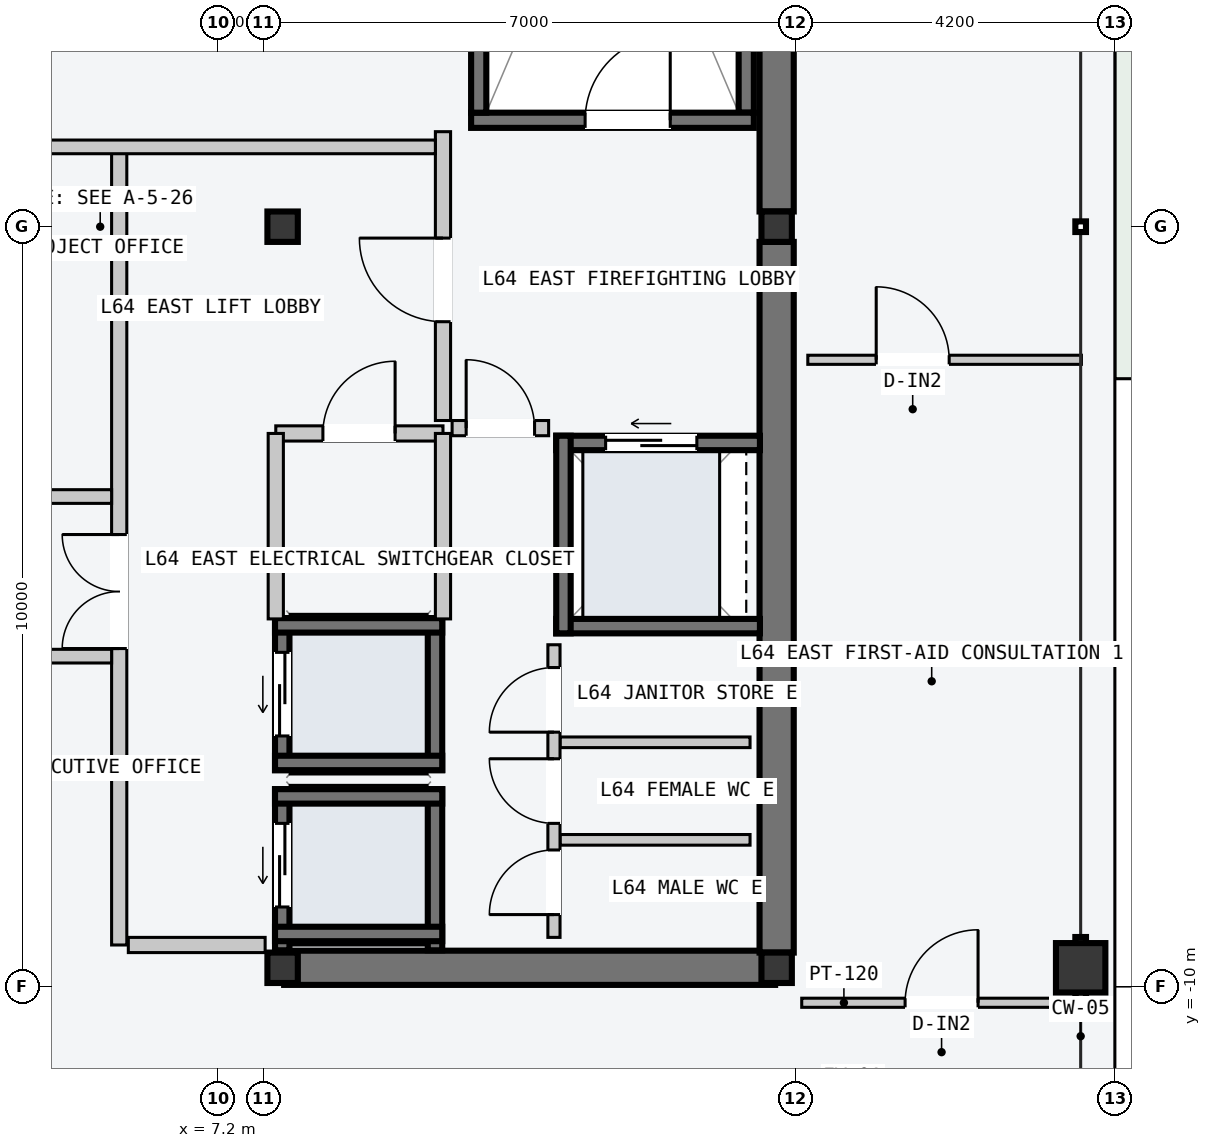
"""IFC4 building model, lengths in metres.
Left out: names, types, materials, properties, quantities, classifications, styles, units other than length and angle.
Written with IfcOpenShell. Run it as: python <this file> out.ifc"""

import sys

from ifc_helpers import new_model, si_unit, direction, frame, frame_2d, origin, origin_2d, place, context, subcontext, project, spatial, rectangle, hollow_rectangle, i_section, extrude, element, fill, save


model = new_model("IFC4")
c1 = context("Model", 3, precision=1e-05, world=origin(), true_north=direction((0.0, 1.0)))
c2 = subcontext(c1, "Body", "Model", "MODEL_VIEW")
j1 = project(units=[si_unit("LENGTHUNIT", "METRE"), si_unit("PLANEANGLEUNIT", "RADIAN")], contexts=[c1])
p1 = place(None, origin())
s1 = spatial("IfcSite", under=j1, at=p1, CompositionType="ELEMENT")
p2 = place(p1, origin())
s2 = spatial("IfcBuilding", under=s1, at=p2, CompositionType="ELEMENT")
p3 = place(p2, frame((0.0, 0.0, 243.6)))
s3 = spatial("IfcBuildingStorey", under=s2, at=p3, CompositionType="ELEMENT", Elevation=243.6)
p4 = place(p3, frame((8.07, -9.75, -0.2), z_axis=(0.0, 0.0, 1.0), x_axis=(1.0, 0.0, 0.0)))
e1 = element("IfcWall", 1, at=p4, inside=s3, PredefinedType="SHEAR", context=c2, shape_type="SweptSolid", body=[
    extrude(rectangle(XDim=6.46, YDim=0.45, at=frame_2d((3.23, 0.0))), origin(), (0.0, 0.0, 1.0), 3.6),
])
for number, where, z_axis, x_axis in (
    (2, (14.55, -9.55, -0.2), (0.0, 0.0, 1.0), (0.0, 1.0, 0.0)),
    (3, (14.55, 0.2, -0.2), (0.0, 0.0, 1.0), (0.0, 1.0, 0.0)),
):
    element("IfcWall", number, at=place(p3, frame(where, z_axis=z_axis, x_axis=x_axis)), inside=s3, PredefinedType="SHEAR", context=c2, shape_type="SweptSolid", body=[
        extrude(rectangle(XDim=9.35, YDim=0.45, at=frame_2d((4.675, 0.0))), origin(), (0.0, 0.0, 1.0), 3.6),
    ])
p5 = place(p3, frame((14.15, 1.5, -0.2), z_axis=(0.0, 0.0, 1.0), x_axis=(0.0, 1.0, 0.0)))
e4 = element("IfcWall", 4, at=p5, inside=s3, PredefinedType="SOLIDWALL", context=c2, shape_type="SweptSolid", body=[
    extrude(rectangle(XDim=7.8, YDim=0.2, at=frame_2d((3.9, 0.0))), origin(), (0.0, 0.0, 1.0), 3.6),
])
p6 = place(p3, frame((10.53, 1.4, -0.2), z_axis=(0.0, 0.0, 1.0), x_axis=(1.0, 0.0, 0.0)))
e5 = element("IfcWall", 5, at=p6, inside=s3, PredefinedType="SOLIDWALL", context=c2, shape_type="SweptSolid", body=[
    extrude(rectangle(XDim=3.72, YDim=0.2, at=frame_2d((1.86, 0.0))), origin(), (0.0, 0.0, 1.0), 3.6),
])
p7 = place(p6, frame((1.5, 0.0, 0.2)))
e6 = element("IfcOpeningElement", 6, at=p7, cuts=e5, PredefinedType="OPENING", context=c2, shape_type="SweptSolid", body=[
    extrude(rectangle(XDim=1.12, YDim=2.18, at=frame_2d((0.56, 1.09))), frame((0.0, 0.11, 0.0), z_axis=(0.0, -1.0, 0.0), x_axis=(1.0, 0.0, 0.0)), (0.0, 0.0, 1.0), 0.22),
])
p8 = place(p3, frame((10.63, 1.5, -0.2), z_axis=(0.0, 0.0, 1.0), x_axis=(0.0, 1.0, 0.0)))
e7 = element("IfcWall", 7, at=p8, inside=s3, PredefinedType="SOLIDWALL", context=c2, shape_type="SweptSolid", body=[
    extrude(rectangle(XDim=7.8, YDim=0.2, at=frame_2d((3.9, 0.0))), origin(), (0.0, 0.0, 1.0), 3.6),
])
for number, where, z_axis, x_axis in (
    (8, (8.05, -9.75, 0.0), (0.0, 0.0, 1.0), (1.0, 0.0, 0.0)),
    (9, (8.05, 0.0, 0.0), (0.0, 0.0, 1.0), (1.0, 0.0, 0.0)),
    (10, (14.55, -9.75, 0.0), (0.0, 0.0, 1.0), (1.0, 0.0, 0.0)),
    (11, (14.55, 0.0, 0.0), (0.0, 0.0, 1.0), (1.0, 0.0, 0.0)),
):
    element("IfcColumn", number, at=place(p3, frame(where, z_axis=z_axis, x_axis=x_axis)), inside=s3, PredefinedType="COLUMN", context=c2, shape_type="SweptSolid", body=[
        extrude(i_section(OverallWidth=0.4, OverallDepth=0.4, WebThickness=0.013, FlangeThickness=0.021, at=origin_2d()), origin(), (0.0, 0.0, 1.0), 3.6),
    ])
p9 = place(p3, frame((18.55, -9.75, 0.0), z_axis=(0.0, 0.0, 1.0), x_axis=(0.0, 1.0, 0.0)))
e12 = element("IfcColumn", 12, at=p9, inside=s3, PredefinedType="COLUMN", context=c2, shape_type="SweptSolid", body=[
    extrude(hollow_rectangle(XDim=0.65, YDim=0.65, WallThickness=0.028, at=origin_2d()), origin(), (0.0, 0.0, 1.0), 3.6),
])
p10 = place(p3, frame((8.045, -9.52, -0.2), z_axis=(0.0, 0.0, 1.0), x_axis=(0.0, 1.0, 0.0)))
e13 = element("IfcWall", 13, at=p10, inside=s3, PredefinedType="SOLIDWALL", context=c2, shape_type="SweptSolid", body=[
    extrude(rectangle(XDim=2.12, YDim=0.19, at=frame_2d((1.06, 0.0))), origin(), (0.0, 0.0, 1.0), 3.6),
])
p11 = place(p10, frame((0.57, 0.0, 0.2)))
e14 = element("IfcOpeningElement", 14, at=p11, cuts=e13, PredefinedType="OPENING", context=c2, shape_type="SweptSolid", body=[
    extrude(rectangle(XDim=1.1, YDim=2.2, at=frame_2d((0.55, 1.1))), frame((0.0, 0.105, 0.0), z_axis=(0.0, -1.0, 0.0), x_axis=(1.0, 0.0, 0.0)), (0.0, 0.0, 1.0), 0.21),
])
p12 = place(p3, frame((10.055, -9.52, -0.2), z_axis=(0.0, 0.0, 1.0), x_axis=(0.0, 1.0, 0.0)))
e15 = element("IfcWall", 15, at=p12, inside=s3, PredefinedType="SOLIDWALL", context=c2, shape_type="SweptSolid", body=[
    extrude(rectangle(XDim=2.12, YDim=0.19, at=frame_2d((1.06, 0.0))), origin(), (0.0, 0.0, 1.0), 3.6),
])
for number, where, z_axis, x_axis in (
    (16, (7.95, -7.495, -0.2), (0.0, 0.0, 1.0), (1.0, 0.0, 0.0)),
    (17, (7.95, -9.305, -0.2), (0.0, 0.0, 1.0), (1.0, 0.0, 0.0)),
):
    element("IfcWall", number, at=place(p3, frame(where, z_axis=z_axis, x_axis=x_axis)), inside=s3, PredefinedType="SOLIDWALL", context=c2, shape_type="SweptSolid", body=[
        extrude(rectangle(XDim=2.2, YDim=0.19, at=frame_2d((1.1, 0.0))), origin(), (0.0, 0.0, 1.0), 3.6),
    ])
p13 = place(p3, frame((8.045, -7.15, -0.2), z_axis=(0.0, 0.0, 1.0), x_axis=(0.0, 1.0, 0.0)))
e18 = element("IfcWall", 18, at=p13, inside=s3, PredefinedType="SOLIDWALL", context=c2, shape_type="SweptSolid", body=[
    extrude(rectangle(XDim=2.0, YDim=0.19, at=frame_2d((1.0, 0.0))), origin(), (0.0, 0.0, 1.0), 3.6),
])
p14 = place(p13, frame((0.45, 0.0, 0.2)))
e19 = element("IfcOpeningElement", 19, at=p14, cuts=e18, PredefinedType="OPENING", context=c2, shape_type="SweptSolid", body=[
    extrude(rectangle(XDim=1.1, YDim=2.2, at=frame_2d((0.55, 1.1))), frame((0.0, 0.105, 0.0), z_axis=(0.0, -1.0, 0.0), x_axis=(1.0, 0.0, 0.0)), (0.0, 0.0, 1.0), 0.21),
])
p15 = place(p3, frame((10.055, -7.15, -0.2), z_axis=(0.0, 0.0, 1.0), x_axis=(0.0, 1.0, 0.0)))
e20 = element("IfcWall", 20, at=p15, inside=s3, PredefinedType="SOLIDWALL", context=c2, shape_type="SweptSolid", body=[
    extrude(rectangle(XDim=2.0, YDim=0.19, at=frame_2d((1.0, 0.0))), origin(), (0.0, 0.0, 1.0), 3.6),
])
for number, where, z_axis, x_axis in (
    (21, (7.95, -5.245, -0.2), (0.0, 0.0, 1.0), (1.0, 0.0, 0.0)),
    (22, (7.95, -7.055, -0.2), (0.0, 0.0, 1.0), (1.0, 0.0, 0.0)),
):
    element("IfcWall", number, at=place(p3, frame(where, z_axis=z_axis, x_axis=x_axis)), inside=s3, PredefinedType="SOLIDWALL", context=c2, shape_type="SweptSolid", body=[
        extrude(rectangle(XDim=2.2, YDim=0.19, at=frame_2d((1.1, 0.0))), origin(), (0.0, 0.0, 1.0), 3.6),
    ])
p16 = place(p3, frame((11.65, -2.845, -0.2), z_axis=(0.0, 0.0, 1.0), x_axis=(1.0, 0.0, 0.0)))
e23 = element("IfcWall", 23, at=p16, inside=s3, PredefinedType="SOLIDWALL", context=c2, shape_type="SweptSolid", body=[
    extrude(rectangle(XDim=2.68, YDim=0.19, at=frame_2d((1.34, 0.0))), origin(), (0.0, 0.0, 1.0), 3.6),
])
p17 = place(p16, frame((0.65, 0.0, 0.2)))
e24 = element("IfcOpeningElement", 24, at=p17, cuts=e23, PredefinedType="OPENING", context=c2, shape_type="SweptSolid", body=[
    extrude(rectangle(XDim=1.2, YDim=2.2, at=frame_2d((0.6, 1.1))), frame((0.0, 0.105, 0.0), z_axis=(0.0, -1.0, 0.0), x_axis=(1.0, 0.0, 0.0)), (0.0, 0.0, 1.0), 0.21),
])
p18 = place(p3, frame((11.65, -5.255, -0.2), z_axis=(0.0, 0.0, 1.0), x_axis=(1.0, 0.0, 0.0)))
e25 = element("IfcWall", 25, at=p18, inside=s3, PredefinedType="SOLIDWALL", context=c2, shape_type="SweptSolid", body=[
    extrude(rectangle(XDim=2.68, YDim=0.19, at=frame_2d((1.34, 0.0))), origin(), (0.0, 0.0, 1.0), 3.6),
])
p19 = place(p3, frame((11.745, -5.35, -0.2), z_axis=(0.0, 0.0, 1.0), x_axis=(0.0, 1.0, 0.0)))
e26 = element("IfcWall", 26, at=p19, inside=s3, PredefinedType="SOLIDWALL", context=c2, shape_type="SweptSolid", body=[
    extrude(rectangle(XDim=2.6, YDim=0.19, at=frame_2d((1.3, 0.0))), origin(), (0.0, 0.0, 1.0), 3.6),
])
p20 = place(p3, frame((5.9, -9.45, 0.0), z_axis=(0.0, 0.0, 1.0), x_axis=(0.0, 1.0, 0.0)))
e27 = element("IfcWall", 27, at=p20, inside=s3, PredefinedType="PARTITIONING", context=c2, shape_type="SweptSolid", body=[
    extrude(rectangle(XDim=10.5, YDim=0.2, at=frame_2d((5.25, 0.0))), origin(), (0.0, 0.0, 1.0), 3.4),
])
p21 = place(p20, frame((3.9, 0.0, 0.0)))
e28 = element("IfcOpeningElement", 28, at=p21, cuts=e27, PredefinedType="OPENING", context=c2, shape_type="SweptSolid", body=[
    extrude(rectangle(XDim=1.5, YDim=2.2, at=frame_2d((0.75, 1.1))), frame((0.0, 0.11, 0.0), z_axis=(0.0, -1.0, 0.0), x_axis=(1.0, 0.0, 0.0)), (0.0, 0.0, 1.0), 0.22),
])
p22 = place(p3, frame((6.02, -9.45, 0.0), z_axis=(0.0, 0.0, 1.0), x_axis=(1.0, 0.0, 0.0)))
e29 = element("IfcWall", 29, at=p22, inside=s3, PredefinedType="PARTITIONING", context=c2, shape_type="SweptSolid", body=[
    extrude(rectangle(XDim=1.8, YDim=0.2, at=frame_2d((0.9, 0.0))), origin(), (0.0, 0.0, 1.0), 3.4),
])
p23 = place(p3, frame((10.16, -2.55, 0.0), z_axis=(0.0, 0.0, 1.0), x_axis=(0.0, 1.0, 0.0)))
e30 = element("IfcWall", 30, at=p23, inside=s3, PredefinedType="PARTITIONING", context=c2, shape_type="SweptSolid", body=[
    extrude(rectangle(XDim=3.8, YDim=0.2, at=frame_2d((1.9, 0.0))), origin(), (0.0, 0.0, 1.0), 3.4),
])
p24 = place(p23, frame((1.3, 0.0, 0.0)))
e31 = element("IfcOpeningElement", 31, at=p24, cuts=e30, PredefinedType="OPENING", context=c2, shape_type="SweptSolid", body=[
    extrude(rectangle(XDim=1.1, YDim=2.15, at=frame_2d((0.55, 1.075))), frame((0.0, 0.11, 0.0), z_axis=(0.0, -1.0, 0.0), x_axis=(1.0, 0.0, 0.0)), (0.0, 0.0, 1.0), 0.22),
])
p25 = place(p3, frame((10.28, -2.65, 0.0), z_axis=(0.0, 0.0, 1.0), x_axis=(1.0, 0.0, 0.0)))
e32 = element("IfcWall", 32, at=p25, inside=s3, PredefinedType="PARTITIONING", context=c2, shape_type="SweptSolid", body=[
    extrude(rectangle(XDim=1.27, YDim=0.2, at=frame_2d((0.635, 0.0))), origin(), (0.0, 0.0, 1.0), 3.4),
])
p26 = place(p25, frame((0.185, 0.0, 0.0)))
e33 = element("IfcOpeningElement", 33, at=p26, cuts=e32, PredefinedType="OPENING", context=c2, shape_type="SweptSolid", body=[
    extrude(rectangle(XDim=0.9, YDim=2.15, at=frame_2d((0.45, 1.075))), frame((0.0, 0.11, 0.0), z_axis=(0.0, -1.0, 0.0), x_axis=(1.0, 0.0, 0.0)), (0.0, 0.0, 1.0), 0.22),
])
p27 = place(p3, frame((7.96, -2.72, 0.0), z_axis=(0.0, 0.0, 1.0), x_axis=(1.0, 0.0, 0.0)))
e34 = element("IfcWall", 34, at=p27, inside=s3, PredefinedType="PARTITIONING", context=c2, shape_type="SweptSolid", body=[
    extrude(rectangle(XDim=2.2, YDim=0.2, at=frame_2d((1.1, 0.0))), origin(), (0.0, 0.0, 1.0), 3.4),
])
p28 = place(p27, frame((0.62, 0.0, 0.0)))
e35 = element("IfcOpeningElement", 35, at=p28, cuts=e34, PredefinedType="OPENING", context=c2, shape_type="SweptSolid", body=[
    extrude(rectangle(XDim=0.95, YDim=2.1, at=frame_2d((0.475, 1.05))), frame((0.0, 0.11, 0.0), z_axis=(0.0, -1.0, 0.0), x_axis=(1.0, 0.0, 0.0)), (0.0, 0.0, 1.0), 0.22),
])
for number, where, z_axis, x_axis in (
    (36, (7.96, -5.16, 0.0), (0.0, 0.0, 1.0), (0.0, 1.0, 0.0)),
    (37, (10.16, -5.16, 0.0), (0.0, 0.0, 1.0), (0.0, 1.0, 0.0)),
):
    element("IfcWall", number, at=place(p3, frame(where, z_axis=z_axis, x_axis=x_axis)), inside=s3, PredefinedType="PARTITIONING", context=c2, shape_type="SweptSolid", body=[
        extrude(rectangle(XDim=2.44, YDim=0.2, at=frame_2d((1.22, 0.0))), origin(), (0.0, 0.0, 1.0), 3.4),
    ])
for number, where, z_axis, x_axis in (
    (38, (11.7, -8.067, 0.0), (0.0, 0.0, 1.0), (1.0, 0.0, 0.0)),
    (39, (11.7, -6.783, 0.0), (0.0, 0.0, 1.0), (1.0, 0.0, 0.0)),
):
    element("IfcWall", number, at=place(p3, frame(where, z_axis=z_axis, x_axis=x_axis)), inside=s3, PredefinedType="PARTITIONING", context=c2, shape_type="SweptSolid", body=[
        extrude(rectangle(XDim=2.5, YDim=0.14, at=frame_2d((1.25, 0.0))), origin(), (0.0, 0.0, 1.0), 3.4),
    ])
p29 = place(p3, frame((11.62, -9.35, 0.0), z_axis=(0.0, 0.0, 1.0), x_axis=(0.0, 1.0, 0.0)))
e40 = element("IfcWall", 40, at=p29, inside=s3, PredefinedType="PARTITIONING", context=c2, shape_type="SweptSolid", body=[
    extrude(rectangle(XDim=3.85, YDim=0.16, at=frame_2d((1.925, 0.0))), origin(), (0.0, 0.0, 1.0), 3.4),
])
p30 = place(p29, frame((0.3, 0.0, 0.0)))
e41 = element("IfcOpeningElement", 41, at=p30, cuts=e40, PredefinedType="OPENING", context=c2, shape_type="SweptSolid", body=[
    extrude(rectangle(XDim=0.85, YDim=2.12, at=frame_2d((0.425, 1.06))), frame((0.0, 0.09, 0.0), z_axis=(0.0, -1.0, 0.0), x_axis=(1.0, 0.0, 0.0)), (0.0, 0.0, 1.0), 0.18),
])
p31 = place(p29, frame((1.5, 0.0, 0.0)))
e42 = element("IfcOpeningElement", 42, at=p31, cuts=e40, PredefinedType="OPENING", context=c2, shape_type="SweptSolid", body=[
    extrude(rectangle(XDim=0.85, YDim=2.12, at=frame_2d((0.425, 1.06))), frame((0.0, 0.09, 0.0), z_axis=(0.0, -1.0, 0.0), x_axis=(1.0, 0.0, 0.0)), (0.0, 0.0, 1.0), 0.18),
])
p32 = place(p29, frame((2.7, 0.0, 0.0)))
e43 = element("IfcOpeningElement", 43, at=p32, cuts=e40, PredefinedType="OPENING", context=c2, shape_type="SweptSolid", body=[
    extrude(rectangle(XDim=0.85, YDim=2.12, at=frame_2d((0.425, 1.06))), frame((0.0, 0.09, 0.0), z_axis=(0.0, -1.0, 0.0), x_axis=(1.0, 0.0, 0.0)), (0.0, 0.0, 1.0), 0.18),
])
p33 = place(p3, frame((3.01, 1.05, 0.0), z_axis=(0.0, 0.0, 1.0), x_axis=(1.0, 0.0, 0.0)))
e44 = element("IfcWall", 44, at=p33, inside=s3, PredefinedType="PARTITIONING", context=c2, shape_type="SweptSolid", body=[
    extrude(rectangle(XDim=7.05, YDim=0.18, at=frame_2d((3.525, 0.0))), origin(), (0.0, 0.0, 1.0), 3.4),
])
for number, where, z_axis, x_axis in (
    (45, (3.01, -3.55, 0.0), (0.0, 0.0, 1.0), (1.0, 0.0, 0.0)),
    (46, (3.01, -5.65, 0.0), (0.0, 0.0, 1.0), (1.0, 0.0, 0.0)),
):
    element("IfcWall", number, at=place(p3, frame(where, z_axis=z_axis, x_axis=x_axis)), inside=s3, PredefinedType="PARTITIONING", context=c2, shape_type="SweptSolid", body=[
        extrude(rectangle(XDim=2.79, YDim=0.18, at=frame_2d((1.395, 0.0))), origin(), (0.0, 0.0, 1.0), 3.4),
    ])
p34 = place(p3, frame((14.88, -10.21, 0.0), z_axis=(0.0, 0.0, 1.0), x_axis=(1.0, 0.0, 0.0)))
e47 = element("IfcWall", 47, at=p34, inside=s3, PredefinedType="PARTITIONING", context=c2, shape_type="SweptSolid", body=[
    extrude(rectangle(XDim=3.68, YDim=0.12, at=frame_2d((1.84, 0.0))), origin(), (0.0, 0.0, 1.0), 3.4),
])
p35 = place(p34, frame((1.36, 0.0, 0.0)))
e48 = element("IfcOpeningElement", 48, at=p35, cuts=e47, PredefinedType="OPENING", context=c2, shape_type="SweptSolid", body=[
    extrude(rectangle(XDim=0.96, YDim=2.18, at=frame_2d((0.48, 1.09))), frame((0.0, 0.07, 0.0), z_axis=(0.0, -1.0, 0.0), x_axis=(1.0, 0.0, 0.0)), (0.0, 0.0, 1.0), 0.14),
])
p36 = place(p3, frame((14.96, -1.751, 0.0), z_axis=(0.0, 0.0, 1.0), x_axis=(1.0, 0.0, 0.0)))
e49 = element("IfcWall", 49, at=p36, inside=s3, PredefinedType="PARTITIONING", context=c2, shape_type="SweptSolid", body=[
    extrude(rectangle(XDim=3.6, YDim=0.12, at=frame_2d((1.8, 0.0))), origin(), (0.0, 0.0, 1.0), 3.4),
])
p37 = place(p36, frame((0.9, 0.0, 0.0)))
e50 = element("IfcOpeningElement", 50, at=p37, cuts=e49, PredefinedType="OPENING", context=c2, shape_type="SweptSolid", body=[
    extrude(rectangle(XDim=0.96, YDim=2.18, at=frame_2d((0.48, 1.09))), frame((0.0, 0.07, 0.0), z_axis=(0.0, -1.0, 0.0), x_axis=(1.0, 0.0, 0.0)), (0.0, 0.0, 1.0), 0.14),
])
p38 = place(p7, origin())
e51 = element("IfcDoor", 51, at=p38, inside=s3, OperationType="SINGLE_SWING_RIGHT", PredefinedType="DOOR", context=c2, shape_type="SweptSolid", body=[
    extrude(rectangle(XDim=1.12, YDim=2.18, at=frame_2d((0.56, 1.09))), frame((0.0, 0.025, 0.0), z_axis=(0.0, -1.0, 0.0), x_axis=(1.0, 0.0, 0.0)), (0.0, 0.0, 1.0), 0.05),
])
fill(e6, e51)
p39 = place(p11, origin())
e52 = element("IfcDoor", 52, at=p39, inside=s3, OperationType="SLIDING_TO_LEFT", PredefinedType="DOOR", context=c2, shape_type="SweptSolid", body=[
    extrude(rectangle(XDim=1.1, YDim=2.2, at=frame_2d((0.55, 1.1))), frame((0.0, 0.025, 0.0), z_axis=(0.0, -1.0, 0.0), x_axis=(1.0, 0.0, 0.0)), (0.0, 0.0, 1.0), 0.05),
])
fill(e14, e52)
p40 = place(p14, origin())
e53 = element("IfcDoor", 53, at=p40, inside=s3, OperationType="SLIDING_TO_LEFT", PredefinedType="DOOR", context=c2, shape_type="SweptSolid", body=[
    extrude(rectangle(XDim=1.1, YDim=2.2, at=frame_2d((0.55, 1.1))), frame((0.0, 0.025, 0.0), z_axis=(0.0, -1.0, 0.0), x_axis=(1.0, 0.0, 0.0)), (0.0, 0.0, 1.0), 0.05),
])
fill(e19, e53)
p41 = place(p17, origin())
e54 = element("IfcDoor", 54, at=p41, inside=s3, OperationType="SLIDING_TO_LEFT", PredefinedType="DOOR", context=c2, shape_type="SweptSolid", body=[
    extrude(rectangle(XDim=1.2, YDim=2.2, at=frame_2d((0.6, 1.1))), frame((0.0, 0.025, 0.0), z_axis=(0.0, -1.0, 0.0), x_axis=(1.0, 0.0, 0.0)), (0.0, 0.0, 1.0), 0.05),
])
fill(e24, e54)
p42 = place(p21, origin())
e55 = element("IfcDoor", 55, at=p42, inside=s3, OperationType="DOUBLE_DOOR_SINGLE_SWING", PredefinedType="DOOR", context=c2, shape_type="SweptSolid", body=[
    extrude(rectangle(XDim=1.5, YDim=2.2, at=frame_2d((0.75, 1.1))), frame((0.0, 0.025, 0.0), z_axis=(0.0, -1.0, 0.0), x_axis=(1.0, 0.0, 0.0)), (0.0, 0.0, 1.0), 0.05),
])
fill(e28, e55)
p43 = place(p24, origin())
e56 = element("IfcDoor", 56, at=p43, inside=s3, OperationType="SINGLE_SWING_RIGHT", PredefinedType="DOOR", context=c2, shape_type="SweptSolid", body=[
    extrude(rectangle(XDim=1.1, YDim=2.15, at=frame_2d((0.55, 1.075))), frame((0.0, 0.025, 0.0), z_axis=(0.0, -1.0, 0.0), x_axis=(1.0, 0.0, 0.0)), (0.0, 0.0, 1.0), 0.05),
])
fill(e31, e56)
p44 = place(p26, origin())
e57 = element("IfcDoor", 57, at=p44, inside=s3, OperationType="SINGLE_SWING_LEFT", PredefinedType="DOOR", context=c2, shape_type="SweptSolid", body=[
    extrude(rectangle(XDim=0.9, YDim=2.15, at=frame_2d((0.45, 1.075))), frame((0.0, 0.025, 0.0), z_axis=(0.0, -1.0, 0.0), x_axis=(1.0, 0.0, 0.0)), (0.0, 0.0, 1.0), 0.05),
])
fill(e33, e57)
p45 = place(p28, origin())
e58 = element("IfcDoor", 58, at=p45, inside=s3, OperationType="SINGLE_SWING_RIGHT", PredefinedType="DOOR", context=c2, shape_type="SweptSolid", body=[
    extrude(rectangle(XDim=0.95, YDim=2.1, at=frame_2d((0.475, 1.05))), frame((0.0, 0.025, 0.0), z_axis=(0.0, -1.0, 0.0), x_axis=(1.0, 0.0, 0.0)), (0.0, 0.0, 1.0), 0.05),
])
fill(e35, e58)
p46 = place(p30, origin())
e59 = element("IfcDoor", 59, at=p46, inside=s3, OperationType="SINGLE_SWING_LEFT", PredefinedType="DOOR", context=c2, shape_type="SweptSolid", body=[
    extrude(rectangle(XDim=0.85, YDim=2.12, at=frame_2d((0.425, 1.06))), frame((0.0, 0.025, 0.0), z_axis=(0.0, -1.0, 0.0), x_axis=(1.0, 0.0, 0.0)), (0.0, 0.0, 1.0), 0.05),
])
fill(e41, e59)
p47 = place(p31, origin())
e60 = element("IfcDoor", 60, at=p47, inside=s3, OperationType="SINGLE_SWING_RIGHT", PredefinedType="DOOR", context=c2, shape_type="SweptSolid", body=[
    extrude(rectangle(XDim=0.85, YDim=2.12, at=frame_2d((0.425, 1.06))), frame((0.0, 0.025, 0.0), z_axis=(0.0, -1.0, 0.0), x_axis=(1.0, 0.0, 0.0)), (0.0, 0.0, 1.0), 0.05),
])
fill(e42, e60)
p48 = place(p32, origin())
e61 = element("IfcDoor", 61, at=p48, inside=s3, OperationType="SINGLE_SWING_LEFT", PredefinedType="DOOR", context=c2, shape_type="SweptSolid", body=[
    extrude(rectangle(XDim=0.85, YDim=2.12, at=frame_2d((0.425, 1.06))), frame((0.0, 0.025, 0.0), z_axis=(0.0, -1.0, 0.0), x_axis=(1.0, 0.0, 0.0)), (0.0, 0.0, 1.0), 0.05),
])
fill(e43, e61)
p49 = place(p35, origin())
e62 = element("IfcDoor", 62, at=p49, inside=s3, OperationType="SINGLE_SWING_RIGHT", PredefinedType="DOOR", context=c2, shape_type="SweptSolid", body=[
    extrude(rectangle(XDim=0.96, YDim=2.18, at=frame_2d((0.48, 1.09))), frame((0.0, 0.025, 0.0), z_axis=(0.0, -1.0, 0.0), x_axis=(1.0, 0.0, 0.0)), (0.0, 0.0, 1.0), 0.05),
])
fill(e48, e62)
p50 = place(p37, origin())
e63 = element("IfcDoor", 63, at=p50, inside=s3, OperationType="SINGLE_SWING_LEFT", PredefinedType="DOOR", context=c2, shape_type="SweptSolid", body=[
    extrude(rectangle(XDim=0.96, YDim=2.18, at=frame_2d((0.48, 1.09))), frame((0.0, 0.025, 0.0), z_axis=(0.0, -1.0, 0.0), x_axis=(1.0, 0.0, 0.0)), (0.0, 0.0, 1.0), 0.05),
])
fill(e50, e63)
save(model, sys.argv[1])
